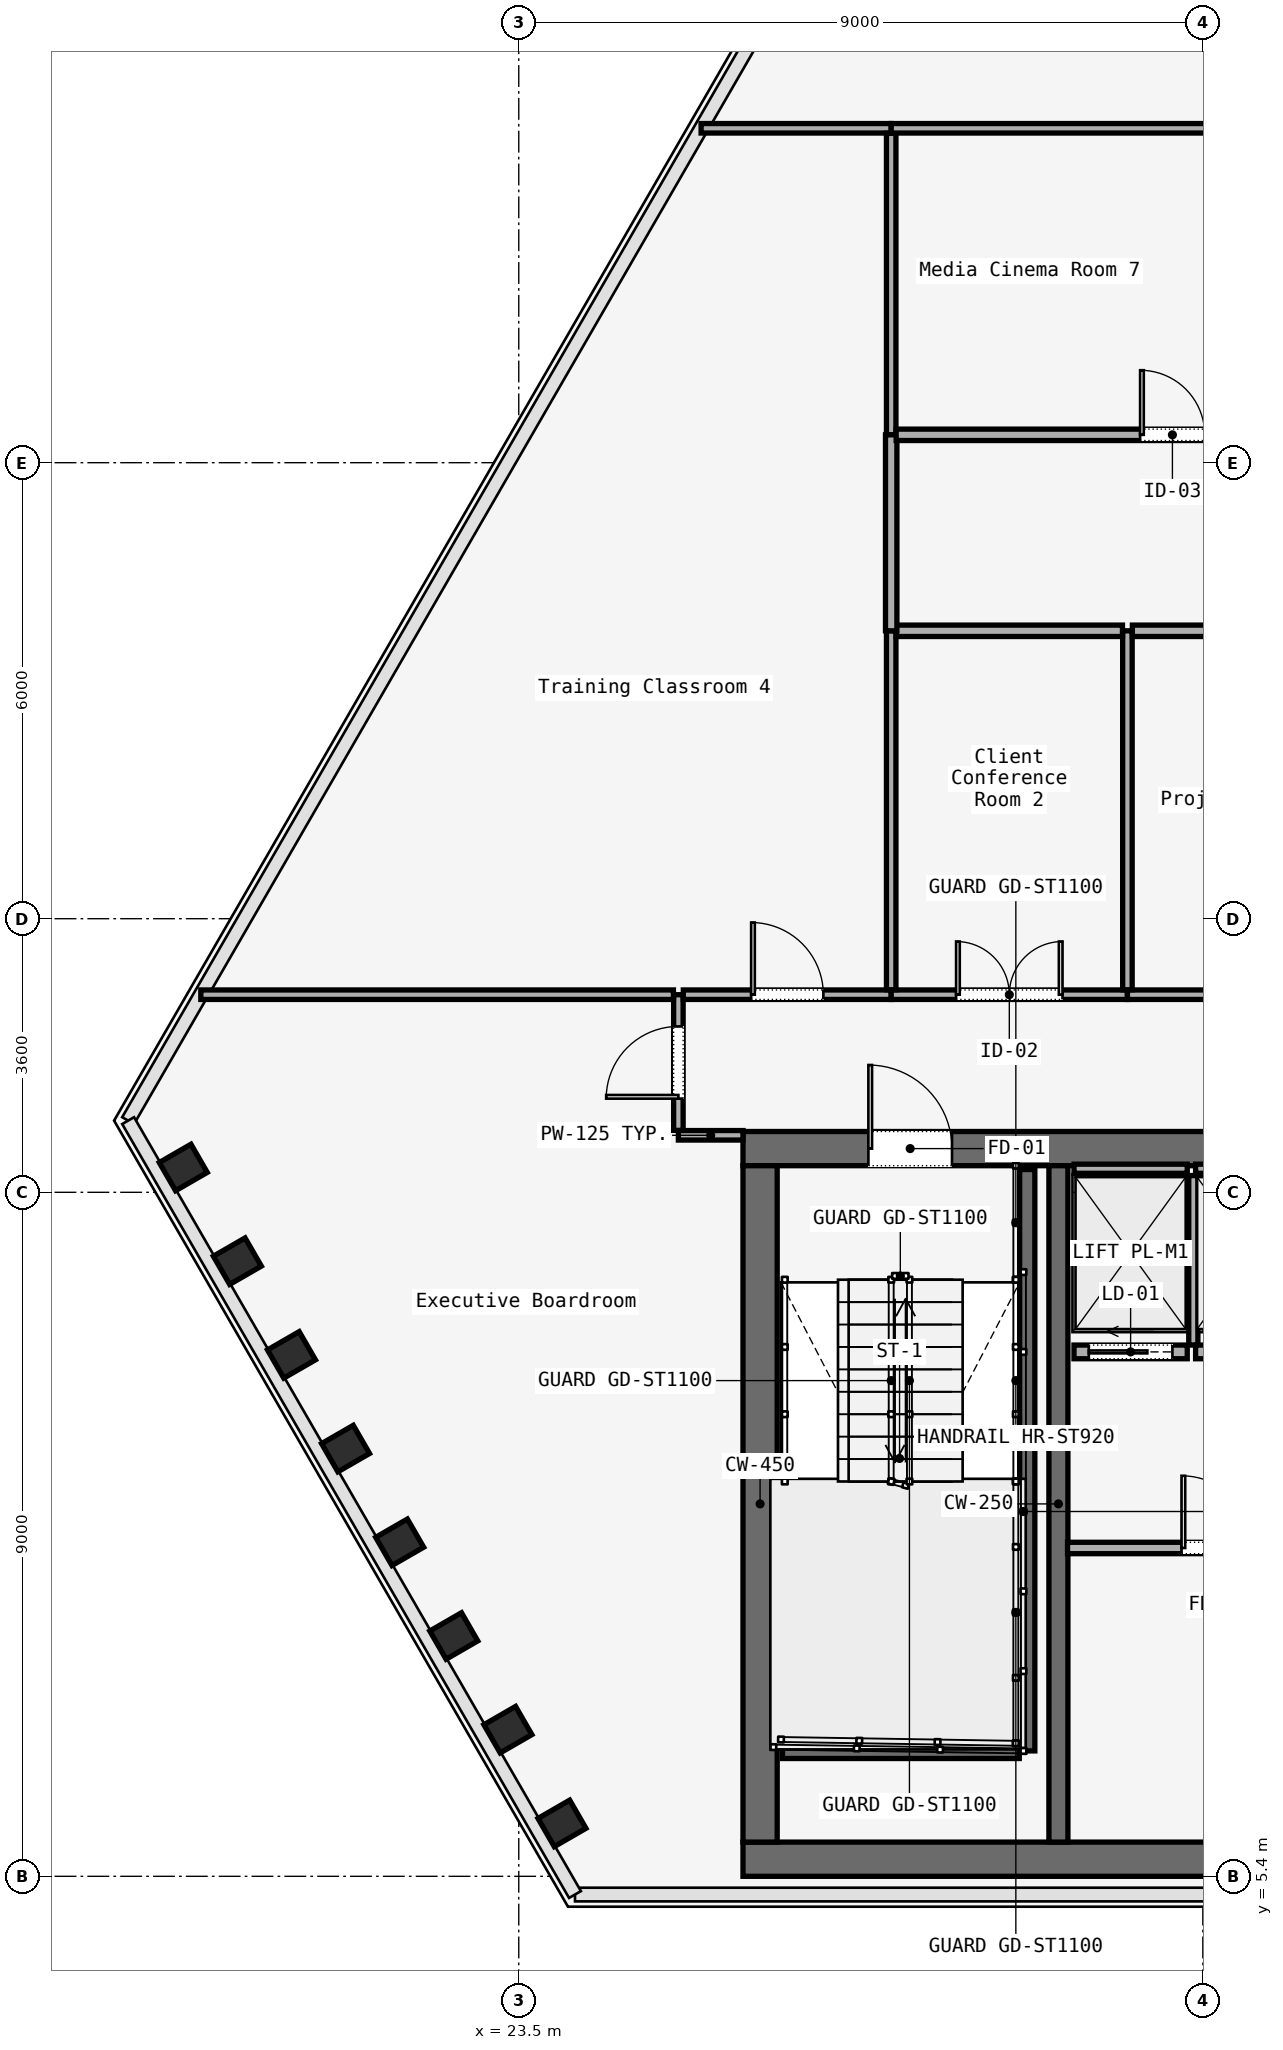
"""IFC4 building model, lengths in metres.
Left out: names, types, materials, properties, quantities, classifications, styles, units other than length and angle.
Written with IfcOpenShell. Run it as: python <this file> out.ifc"""

import sys

from ifc_helpers import new_model, si_unit, direction, frame, frame_2d, origin, origin_2d, place, context, subcontext, project, spatial, rectangle, i_section, extrude, element, fill, save


model = new_model("IFC4")
c1 = context("Model", 3, precision=1e-05, world=origin(), true_north=direction((0.0, 1.0)))
c2 = subcontext(c1, "Body", "Model", "MODEL_VIEW")
j1 = project(units=[si_unit("LENGTHUNIT", "METRE"), si_unit("PLANEANGLEUNIT", "RADIAN")], contexts=[c1])
p1 = place(None, origin())
s1 = spatial("IfcSite", under=j1, at=p1, CompositionType="ELEMENT")
p2 = place(p1, origin())
s2 = spatial("IfcBuilding", under=s1, at=p2, CompositionType="ELEMENT")
p3 = place(p2, frame((0.0, 0.0, 142.2)))
s3 = spatial("IfcBuildingStorey", under=s2, at=p3, CompositionType="ELEMENT", Elevation=142.2)
p4 = place(p3, frame((26.45, 14.975, 0.0), z_axis=(0.0, 0.0, 1.0), x_axis=(1.0, 0.0, 0.0)))
e1 = element("IfcWall", 1, at=p4, inside=s3, PredefinedType="SOLIDWALL", context=c2, shape_type="SweptSolid", body=[
    extrude(rectangle(XDim=31.1, YDim=0.45, at=frame_2d((15.55, 0.0))), origin(), (0.0, 0.0, 1.0), 3.58),
])
p5 = place(p4, frame((1.65, 0.0, 0.0)))
e2 = element("IfcOpeningElement", 2, at=p5, cuts=e1, PredefinedType="OPENING", context=c2, shape_type="SweptSolid", body=[
    extrude(rectangle(XDim=1.1, YDim=2.2, at=frame_2d((0.55, 1.1))), frame((0.0, 0.225, 0.0), z_axis=(0.0, -1.0, 0.0), x_axis=(1.0, 0.0, 0.0)), (0.0, 0.0, 1.0), 0.45),
])
p6 = place(p4, frame((13.65, 0.0, 0.0)))
e3 = element("IfcOpeningElement", 3, at=p6, cuts=e1, PredefinedType="OPENING", context=c2, shape_type="SweptSolid", body=[
    extrude(rectangle(XDim=1.1, YDim=2.2, at=frame_2d((0.55, 1.1))), frame((0.0, 0.225, 0.0), z_axis=(0.0, -1.0, 0.0), x_axis=(1.0, 0.0, 0.0)), (0.0, 0.0, 1.0), 0.45),
])
p7 = place(p4, frame((25.55, 0.0, 0.0)))
e4 = element("IfcOpeningElement", 4, at=p7, cuts=e1, PredefinedType="OPENING", context=c2, shape_type="SweptSolid", body=[
    extrude(rectangle(XDim=1.1, YDim=2.2, at=frame_2d((0.55, 1.1))), frame((0.0, 0.225, 0.0), z_axis=(0.0, -1.0, 0.0), x_axis=(1.0, 0.0, 0.0)), (0.0, 0.0, 1.0), 0.45),
])
p8 = place(p4, frame((10.7, 0.0, 0.0)))
e5 = element("IfcOpeningElement", 5, at=p8, cuts=e1, PredefinedType="OPENING", context=c2, shape_type="SweptSolid", body=[
    extrude(rectangle(XDim=1.4, YDim=2.2, at=frame_2d((0.7, 1.1))), frame((0.0, 0.225, 0.0), z_axis=(0.0, -1.0, 0.0), x_axis=(1.0, 0.0, 0.0)), (0.0, 0.0, 1.0), 0.45),
])
p9 = place(p4, frame((19.35, 0.0, 0.0)))
e6 = element("IfcOpeningElement", 6, at=p9, cuts=e1, PredefinedType="OPENING", context=c2, shape_type="SweptSolid", body=[
    extrude(rectangle(XDim=1.1, YDim=2.2, at=frame_2d((0.55, 1.1))), frame((0.0, 0.225, 0.0), z_axis=(0.0, -1.0, 0.0), x_axis=(1.0, 0.0, 0.0)), (0.0, 0.0, 1.0), 0.45),
])
p10 = place(p4, frame((21.4, 0.0, 0.0)))
e7 = element("IfcOpeningElement", 7, at=p10, cuts=e1, PredefinedType="OPENING", context=c2, shape_type="SweptSolid", body=[
    extrude(rectangle(XDim=0.9, YDim=2.1, at=frame_2d((0.45, 1.05))), frame((0.0, 0.225, 0.0), z_axis=(0.0, -1.0, 0.0), x_axis=(1.0, 0.0, 0.0)), (0.0, 0.0, 1.0), 0.45),
])
p11 = place(p4, frame((23.35, 0.0, 0.0)))
e8 = element("IfcOpeningElement", 8, at=p11, cuts=e1, PredefinedType="OPENING", context=c2, shape_type="SweptSolid", body=[
    extrude(rectangle(XDim=1.3, YDim=2.3, at=frame_2d((0.65, 1.15))), frame((0.0, 0.225, 0.0), z_axis=(0.0, -1.0, 0.0), x_axis=(1.0, 0.0, 0.0)), (0.0, 0.0, 1.0), 0.45),
])
p12 = place(p3, frame((26.45, 5.625, 0.0), z_axis=(0.0, 0.0, 1.0), x_axis=(1.0, 0.0, 0.0)))
e9 = element("IfcWall", 9, at=p12, inside=s3, PredefinedType="SOLIDWALL", context=c2, shape_type="SweptSolid", body=[
    extrude(rectangle(XDim=31.1, YDim=0.45, at=frame_2d((15.55, 0.0))), origin(), (0.0, 0.0, 1.0), 3.58),
])
p13 = place(p3, frame((26.675, 5.85, 0.0), z_axis=(0.0, 0.0, 1.0), x_axis=(0.0, 1.0, 0.0)))
e10 = element("IfcWall", 10, at=p13, inside=s3, PredefinedType="SOLIDWALL", context=c2, shape_type="SweptSolid", body=[
    extrude(rectangle(XDim=8.9, YDim=0.45, at=frame_2d((4.45, 0.0))), origin(), (0.0, 0.0, 1.0), 3.58),
])
p14 = place(p3, frame((30.6, 5.85, 0.0), z_axis=(0.0, 0.0, 1.0), x_axis=(0.0, 1.0, 0.0)))
e11 = element("IfcWall", 11, at=p14, inside=s3, PredefinedType="SOLIDWALL", context=c2, shape_type="SweptSolid", body=[
    extrude(rectangle(XDim=8.9, YDim=0.25, at=frame_2d((4.45, 0.0))), origin(), (0.0, 0.0, 1.0), 3.58),
])
for number, where, z_axis, x_axis in (
    (12, (19.086, 14.727, 0.0), (0.0, 0.0, 1.0), (-0.5, 0.866, 0.0)),
    (13, (19.798, 13.494, 0.0), (0.0, 0.0, 1.0), (-0.5, 0.866, 0.0)),
    (14, (20.51, 12.261, 0.0), (0.0, 0.0, 1.0), (-0.5, 0.866, 0.0)),
    (15, (21.221, 11.028, 0.0), (0.0, 0.0, 1.0), (-0.5, 0.866, 0.0)),
    (16, (21.933, 9.795, 0.0), (0.0, 0.0, 1.0), (-0.5, 0.866, 0.0)),
    (17, (22.645, 8.562, 0.0), (0.0, 0.0, 1.0), (-0.5, 0.866, 0.0)),
    (18, (23.357, 7.329, 0.0), (0.0, 0.0, 1.0), (-0.5, 0.866, 0.0)),
    (19, (24.069, 6.096, 0.0), (0.0, 0.0, 1.0), (-0.5, 0.866, 0.0)),
):
    element("IfcColumn", number, at=place(p3, frame(where, z_axis=z_axis, x_axis=x_axis)), inside=s3, PredefinedType="COLUMN", context=c2, shape_type="SweptSolid", body=[
        extrude(i_section(OverallWidth=0.428, OverallDepth=0.481, WebThickness=0.051, FlangeThickness=0.065, FilletRadius=0.015, at=origin_2d()), origin(), (0.0, 0.0, 1.0), 3.58),
    ])
p15 = place(p3, frame((30.19, 14.7, 0.0), z_axis=(0.0, 0.0, 1.0), x_axis=(0.0, -1.0, 0.0)))
e20 = element("IfcWall", 20, at=p15, inside=s3, PredefinedType="SOLIDWALL", context=c2, shape_type="SweptSolid", body=[
    extrude(rectangle(XDim=7.65, YDim=0.2, at=frame_2d((3.825, 0.0))), origin(), (0.0, 0.0, 1.0), 3.8),
])
p16 = place(p3, frame((26.97, 7.05, 0.0), z_axis=(0.0, 0.0, 1.0), x_axis=(1.0, 0.0, 0.0)))
e21 = element("IfcWall", 21, at=p16, inside=s3, PredefinedType="SOLIDWALL", context=c2, shape_type="SweptSolid", body=[
    extrude(rectangle(XDim=3.115, YDim=0.2, at=frame_2d((1.558, 0.0))), origin(), (0.0, 0.0, 1.0), 3.8),
])
p17 = place(p3, frame((30.72, 9.72, 0.0), z_axis=(0.0, 0.0, 1.0), x_axis=(1.0, 0.0, 0.0)))
e22 = element("IfcWall", 22, at=p17, inside=s3, PredefinedType="PARTITIONING", context=c2, shape_type="SweptSolid", body=[
    extrude(rectangle(XDim=7.96, YDim=0.15, at=frame_2d((3.98, 0.0))), origin(), (0.0, 0.0, 1.0), 3.01),
])
p18 = place(p17, frame((1.5, 0.0, 0.0)))
e23 = element("IfcOpeningElement", 23, at=p18, cuts=e22, PredefinedType="OPENING", context=c2, shape_type="SweptSolid", body=[
    extrude(rectangle(XDim=0.95, YDim=2.2, at=frame_2d((0.475, 1.1))), frame((0.0, 0.075, 0.0), z_axis=(0.0, -1.0, 0.0), x_axis=(1.0, 0.0, 0.0)), (0.0, 0.0, 1.0), 0.15),
])
p19 = place(p17, frame((6.21, 0.0, 0.0)))
e24 = element("IfcOpeningElement", 24, at=p19, cuts=e22, PredefinedType="OPENING", context=c2, shape_type="SweptSolid", body=[
    extrude(rectangle(XDim=0.95, YDim=2.2, at=frame_2d((0.475, 1.1))), frame((0.0, 0.075, 0.0), z_axis=(0.0, -1.0, 0.0), x_axis=(1.0, 0.0, 0.0)), (0.0, 0.0, 1.0), 0.15),
])
p20 = place(p3, frame((30.805, 12.3, 0.0), z_axis=(0.0, 0.0, 1.0), x_axis=(1.0, 0.0, 0.0)))
e25 = element("IfcWall", 25, at=p20, inside=s3, PredefinedType="SOLIDWALL", context=c2, shape_type="SweptSolid", body=[
    extrude(rectangle(XDim=1.49, YDim=0.18, at=frame_2d((0.745, 0.0))), origin(), (0.0, 0.0, 1.0), 3.01),
])
p21 = place(p20, frame((0.195, 0.0, 0.0)))
e26 = element("IfcOpeningElement", 26, at=p21, cuts=e25, PredefinedType="OPENING", context=c2, shape_type="SweptSolid", body=[
    extrude(rectangle(XDim=1.1, YDim=2.2, at=frame_2d((0.55, 1.1))), frame((0.0, 0.09, 0.0), z_axis=(0.0, -1.0, 0.0), x_axis=(1.0, 0.0, 0.0)), (0.0, 0.0, 1.0), 0.18),
])
p22 = place(p3, frame((30.805, 14.71, 0.0), z_axis=(0.0, 0.0, 1.0), x_axis=(1.0, 0.0, 0.0)))
e27 = element("IfcWall", 27, at=p22, inside=s3, PredefinedType="SOLIDWALL", context=c2, shape_type="SweptSolid", body=[
    extrude(rectangle(XDim=1.49, YDim=0.12, at=frame_2d((0.745, 0.0))), origin(), (0.0, 0.0, 1.0), 3.01),
])
p23 = place(p3, frame((32.375, 12.39, 0.0), z_axis=(0.0, 0.0, 1.0), x_axis=(0.0, 1.0, 0.0)))
e28 = element("IfcWall", 28, at=p23, inside=s3, PredefinedType="SOLIDWALL", context=c2, shape_type="SweptSolid", body=[
    extrude(rectangle(XDim=2.23, YDim=0.12, at=frame_2d((1.115, 0.0))), origin(), (0.0, 0.0, 1.0), 3.01),
])
p24 = place(p3, frame((32.405, 12.3, 0.0), z_axis=(0.0, 0.0, 1.0), x_axis=(1.0, 0.0, 0.0)))
e29 = element("IfcWall", 29, at=p24, inside=s3, PredefinedType="SOLIDWALL", context=c2, shape_type="SweptSolid", body=[
    extrude(rectangle(XDim=1.49, YDim=0.18, at=frame_2d((0.745, 0.0))), origin(), (0.0, 0.0, 1.0), 3.01),
])
p25 = place(p24, frame((0.195, 0.0, 0.0)))
e30 = element("IfcOpeningElement", 30, at=p25, cuts=e29, PredefinedType="OPENING", context=c2, shape_type="SweptSolid", body=[
    extrude(rectangle(XDim=1.1, YDim=2.2, at=frame_2d((0.55, 1.1))), frame((0.0, 0.09, 0.0), z_axis=(0.0, -1.0, 0.0), x_axis=(1.0, 0.0, 0.0)), (0.0, 0.0, 1.0), 0.18),
])
p26 = place(p3, frame((32.405, 14.71, 0.0), z_axis=(0.0, 0.0, 1.0), x_axis=(1.0, 0.0, 0.0)))
e31 = element("IfcWall", 31, at=p26, inside=s3, PredefinedType="SOLIDWALL", context=c2, shape_type="SweptSolid", body=[
    extrude(rectangle(XDim=1.49, YDim=0.12, at=frame_2d((0.745, 0.0))), origin(), (0.0, 0.0, 1.0), 3.01),
])
p27 = place(p3, frame((26.45, 15.15, 0.0), z_axis=(0.0, 0.0, 1.0), x_axis=(-1.0, 0.0, 0.0)))
e32 = element("IfcWall", 32, at=p27, inside=s3, PredefinedType="PARTITIONING", context=c2, shape_type="SweptSolid", body=[
    extrude(rectangle(XDim=0.85, YDim=0.125, at=frame_2d((0.425, 0.0))), origin(), (0.0, 0.0, 1.0), 3.01),
])
p28 = place(p3, frame((25.6, 15.215, 0.0), z_axis=(0.0, 0.0, 1.0), x_axis=(0.0, 1.0, 0.0)))
e33 = element("IfcWall", 33, at=p28, inside=s3, PredefinedType="PARTITIONING", context=c2, shape_type="SweptSolid", body=[
    extrude(rectangle(XDim=1.785, YDim=0.125, at=frame_2d((0.893, 0.0))), origin(), (0.0, 0.0, 1.0), 3.01),
])
p29 = place(p28, frame((0.417, 0.0, 0.0)))
e34 = element("IfcOpeningElement", 34, at=p29, cuts=e33, PredefinedType="OPENING", context=c2, shape_type="SweptSolid", body=[
    extrude(rectangle(XDim=0.95, YDim=2.2, at=frame_2d((0.475, 1.1))), frame((0.0, 0.062, 0.0), z_axis=(0.0, -1.0, 0.0), x_axis=(1.0, 0.0, 0.0)), (0.0, 0.0, 1.0), 0.125),
])
p30 = place(p3, frame((25.665, 17.0, 0.0), z_axis=(0.0, 0.0, 1.0), x_axis=(1.0, 0.0, 0.0)))
e35 = element("IfcWall", 35, at=p30, inside=s3, PredefinedType="PARTITIONING", context=c2, shape_type="SweptSolid", body=[
    extrude(rectangle(XDim=2.735, YDim=0.125, at=frame_2d((1.367, 0.0))), origin(), (0.0, 0.0, 1.0), 3.01),
])
p31 = place(p30, frame((0.893, 0.0, 0.0)))
e36 = element("IfcOpeningElement", 36, at=p31, cuts=e35, PredefinedType="OPENING", context=c2, shape_type="SweptSolid", body=[
    extrude(rectangle(XDim=0.95, YDim=2.2, at=frame_2d((0.475, 1.1))), frame((0.0, 0.062, 0.0), z_axis=(0.0, -1.0, 0.0), x_axis=(1.0, 0.0, 0.0)), (0.0, 0.0, 1.0), 0.125),
])
p32 = place(p3, frame((28.4, 17.0, 0.0), z_axis=(0.0, 0.0, 1.0), x_axis=(1.0, 0.0, 0.0)))
e37 = element("IfcWall", 37, at=p32, inside=s3, PredefinedType="PARTITIONING", context=c2, shape_type="SweptSolid", body=[
    extrude(rectangle(XDim=3.108, YDim=0.125, at=frame_2d((1.554, 0.0))), origin(), (0.0, 0.0, 1.0), 3.01),
])
p33 = place(p32, frame((0.854, 0.0, 0.0)))
e38 = element("IfcOpeningElement", 38, at=p33, cuts=e37, PredefinedType="OPENING", context=c2, shape_type="SweptSolid", body=[
    extrude(rectangle(XDim=1.4, YDim=2.2, at=frame_2d((0.7, 1.1))), frame((0.0, 0.062, 0.0), z_axis=(0.0, -1.0, 0.0), x_axis=(1.0, 0.0, 0.0)), (0.0, 0.0, 1.0), 0.125),
])
p34 = place(p3, frame((31.508, 17.0, 0.0), z_axis=(0.0, 0.0, 1.0), x_axis=(1.0, 0.0, 0.0)))
e39 = element("IfcWall", 39, at=p34, inside=s3, PredefinedType="PARTITIONING", context=c2, shape_type="SweptSolid", body=[
    extrude(rectangle(XDim=4.292, YDim=0.125, at=frame_2d((2.146, 0.0))), origin(), (0.0, 0.0, 1.0), 3.01),
])
p35 = place(p3, frame((19.317, 17.0, 0.0), z_axis=(0.0, 0.0, 1.0), x_axis=(1.0, 0.0, 0.0)))
e40 = element("IfcWall", 40, at=p35, inside=s3, PredefinedType="PARTITIONING", context=c2, shape_type="SweptSolid", body=[
    extrude(rectangle(XDim=6.218, YDim=0.125, at=frame_2d((3.109, 0.0))), origin(), (0.0, 0.0, 1.0), 3.01),
])
for number, where, z_axis, x_axis in (
    (41, (31.508, 21.788, 0.0), (0.0, 0.0, 1.0), (0.0, -1.0, 0.0)),
    (42, (28.4, 17.065, 0.0), (0.0, 0.0, 1.0), (0.0, 1.0, 0.0)),
):
    element("IfcWall", number, at=place(p3, frame(where, z_axis=z_axis, x_axis=x_axis)), inside=s3, PredefinedType="PARTITIONING", context=c2, shape_type="SweptSolid", body=[
        extrude(rectangle(XDim=4.723, YDim=0.125, at=frame_2d((2.362, 0.0))), origin(), (0.0, 0.0, 1.0), 3.01),
    ])
p36 = place(p3, frame((28.465, 21.788, 0.0), z_axis=(0.0, 0.0, 1.0), x_axis=(1.0, 0.0, 0.0)))
e43 = element("IfcWall", 43, at=p36, inside=s3, PredefinedType="PARTITIONING", context=c2, shape_type="SweptSolid", body=[
    extrude(rectangle(XDim=2.978, YDim=0.15, at=frame_2d((1.489, 0.0))), origin(), (0.0, 0.0, 1.0), 3.01),
])
p37 = place(p3, frame((31.573, 21.788, 0.0), z_axis=(0.0, 0.0, 1.0), x_axis=(1.0, 0.0, 0.0)))
e44 = element("IfcWall", 44, at=p37, inside=s3, PredefinedType="PARTITIONING", context=c2, shape_type="SweptSolid", body=[
    extrude(rectangle(XDim=4.162, YDim=0.15, at=frame_2d((2.081, 0.0))), origin(), (0.0, 0.0, 1.0), 3.01),
])
p38 = place(p3, frame((25.899, 28.4, 0.0), z_axis=(0.0, 0.0, 1.0), x_axis=(1.0, 0.0, 0.0)))
e45 = element("IfcWall", 45, at=p38, inside=s3, PredefinedType="PARTITIONING", context=c2, shape_type="SweptSolid", body=[
    extrude(rectangle(XDim=2.501, YDim=0.125, at=frame_2d((1.25, 0.0))), origin(), (0.0, 0.0, 1.0), 3.01),
])
p39 = place(p3, frame((28.4, 28.335, 0.0), z_axis=(0.0, 0.0, 1.0), x_axis=(0.0, -1.0, 0.0)))
e46 = element("IfcWall", 46, at=p39, inside=s3, PredefinedType="PARTITIONING", context=c2, shape_type="SweptSolid", body=[
    extrude(rectangle(XDim=3.968, YDim=0.125, at=frame_2d((1.984, 0.0))), origin(), (0.0, 0.0, 1.0), 3.01),
])
p40 = place(p3, frame((28.4, 24.367, 0.0), z_axis=(0.0, 0.0, 1.0), x_axis=(0.0, -1.0, 0.0)))
e47 = element("IfcWall", 47, at=p40, inside=s3, PredefinedType="PARTITIONING", context=c2, shape_type="SweptSolid", body=[
    extrude(rectangle(XDim=2.579, YDim=0.15, at=frame_2d((1.289, 0.0))), origin(), (0.0, 0.0, 1.0), 3.01),
])
p41 = place(p3, frame((28.465, 24.367, 0.0), z_axis=(0.0, 0.0, 1.0), x_axis=(1.0, 0.0, 0.0)))
e48 = element("IfcWall", 48, at=p41, inside=s3, PredefinedType="PARTITIONING", context=c2, shape_type="SweptSolid", body=[
    extrude(rectangle(XDim=7.27, YDim=0.15, at=frame_2d((3.635, 0.0))), origin(), (0.0, 0.0, 1.0), 3.01),
])
p42 = place(p41, frame((3.21, 0.0, 0.0)))
e49 = element("IfcOpeningElement", 49, at=p42, cuts=e48, PredefinedType="OPENING", context=c2, shape_type="SweptSolid", body=[
    extrude(rectangle(XDim=0.85, YDim=2.15, at=frame_2d((0.425, 1.075))), frame((0.0, 0.075, 0.0), z_axis=(0.0, -1.0, 0.0), x_axis=(1.0, 0.0, 0.0)), (0.0, 0.0, 1.0), 0.15),
])
p43 = place(p3, frame((28.4, 28.4, 0.0), z_axis=(0.0, 0.0, 1.0), x_axis=(1.0, 0.0, 0.0)))
e50 = element("IfcWall", 50, at=p43, inside=s3, PredefinedType="PARTITIONING", context=c2, shape_type="SweptSolid", body=[
    extrude(rectangle(XDim=5.0, YDim=0.125, at=frame_2d((2.5, 0.0))), origin(), (0.0, 0.0, 1.0), 3.01),
])
p44 = place(p5, origin())
e51 = element("IfcDoor", 51, at=p44, inside=s3, OperationType="SINGLE_SWING_RIGHT", PredefinedType="DOOR", context=c2, shape_type="SweptSolid", body=[
    extrude(rectangle(XDim=1.1, YDim=2.2, at=frame_2d((0.55, 1.1))), frame((0.0, 0.025, 0.0), z_axis=(0.0, -1.0, 0.0), x_axis=(1.0, 0.0, 0.0)), (0.0, 0.0, 1.0), 0.05),
])
fill(e2, e51)
p45 = place(p18, origin())
e52 = element("IfcDoor", 52, at=p45, inside=s3, OperationType="SINGLE_SWING_LEFT", PredefinedType="DOOR", context=c2, shape_type="SweptSolid", body=[
    extrude(rectangle(XDim=0.95, YDim=2.2, at=frame_2d((0.475, 1.1))), frame((0.0, 0.025, 0.0), z_axis=(0.0, -1.0, 0.0), x_axis=(1.0, 0.0, 0.0)), (0.0, 0.0, 1.0), 0.05),
])
fill(e23, e52)
p46 = place(p21, origin())
e53 = element("IfcDoor", 53, at=p46, inside=s3, OperationType="SLIDING_TO_LEFT", PredefinedType="DOOR", context=c2, shape_type="SweptSolid", body=[
    extrude(rectangle(XDim=1.1, YDim=2.2, at=frame_2d((0.55, 1.1))), frame((0.0, 0.025, 0.0), z_axis=(0.0, -1.0, 0.0), x_axis=(1.0, 0.0, 0.0)), (0.0, 0.0, 1.0), 0.05),
])
fill(e26, e53)
p47 = place(p29, origin())
e54 = element("IfcDoor", 54, at=p47, inside=s3, OperationType="SINGLE_SWING_RIGHT", PredefinedType="DOOR", context=c2, shape_type="SweptSolid", body=[
    extrude(rectangle(XDim=0.95, YDim=2.2, at=frame_2d((0.475, 1.1))), frame((0.0, 0.025, 0.0), z_axis=(0.0, -1.0, 0.0), x_axis=(1.0, 0.0, 0.0)), (0.0, 0.0, 1.0), 0.05),
])
fill(e34, e54)
p48 = place(p33, origin())
e55 = element("IfcDoor", 55, at=p48, inside=s3, OperationType="SINGLE_SWING_RIGHT", PredefinedType="DOOR", context=c2, shape_type="SweptSolid", body=[
    extrude(rectangle(XDim=1.4, YDim=2.2, at=frame_2d((0.7, 1.1))), frame((0.0, 0.025, 0.0), z_axis=(0.0, -1.0, 0.0), x_axis=(1.0, 0.0, 0.0)), (0.0, 0.0, 1.0), 0.05),
])
fill(e38, e55)
p49 = place(p31, origin())
e56 = element("IfcDoor", 56, at=p49, inside=s3, OperationType="SINGLE_SWING_RIGHT", PredefinedType="DOOR", context=c2, shape_type="SweptSolid", body=[
    extrude(rectangle(XDim=0.95, YDim=2.2, at=frame_2d((0.475, 1.1))), frame((0.0, 0.025, 0.0), z_axis=(0.0, -1.0, 0.0), x_axis=(1.0, 0.0, 0.0)), (0.0, 0.0, 1.0), 0.05),
])
fill(e36, e56)
p50 = place(p42, origin())
e57 = element("IfcDoor", 57, at=p50, inside=s3, OperationType="SINGLE_SWING_LEFT", PredefinedType="DOOR", context=c2, shape_type="SweptSolid", body=[
    extrude(rectangle(XDim=0.85, YDim=2.15, at=frame_2d((0.425, 1.075))), frame((0.0, 0.025, 0.0), z_axis=(0.0, -1.0, 0.0), x_axis=(1.0, 0.0, 0.0)), (0.0, 0.0, 1.0), 0.05),
])
fill(e49, e57)
save(model, sys.argv[1])
